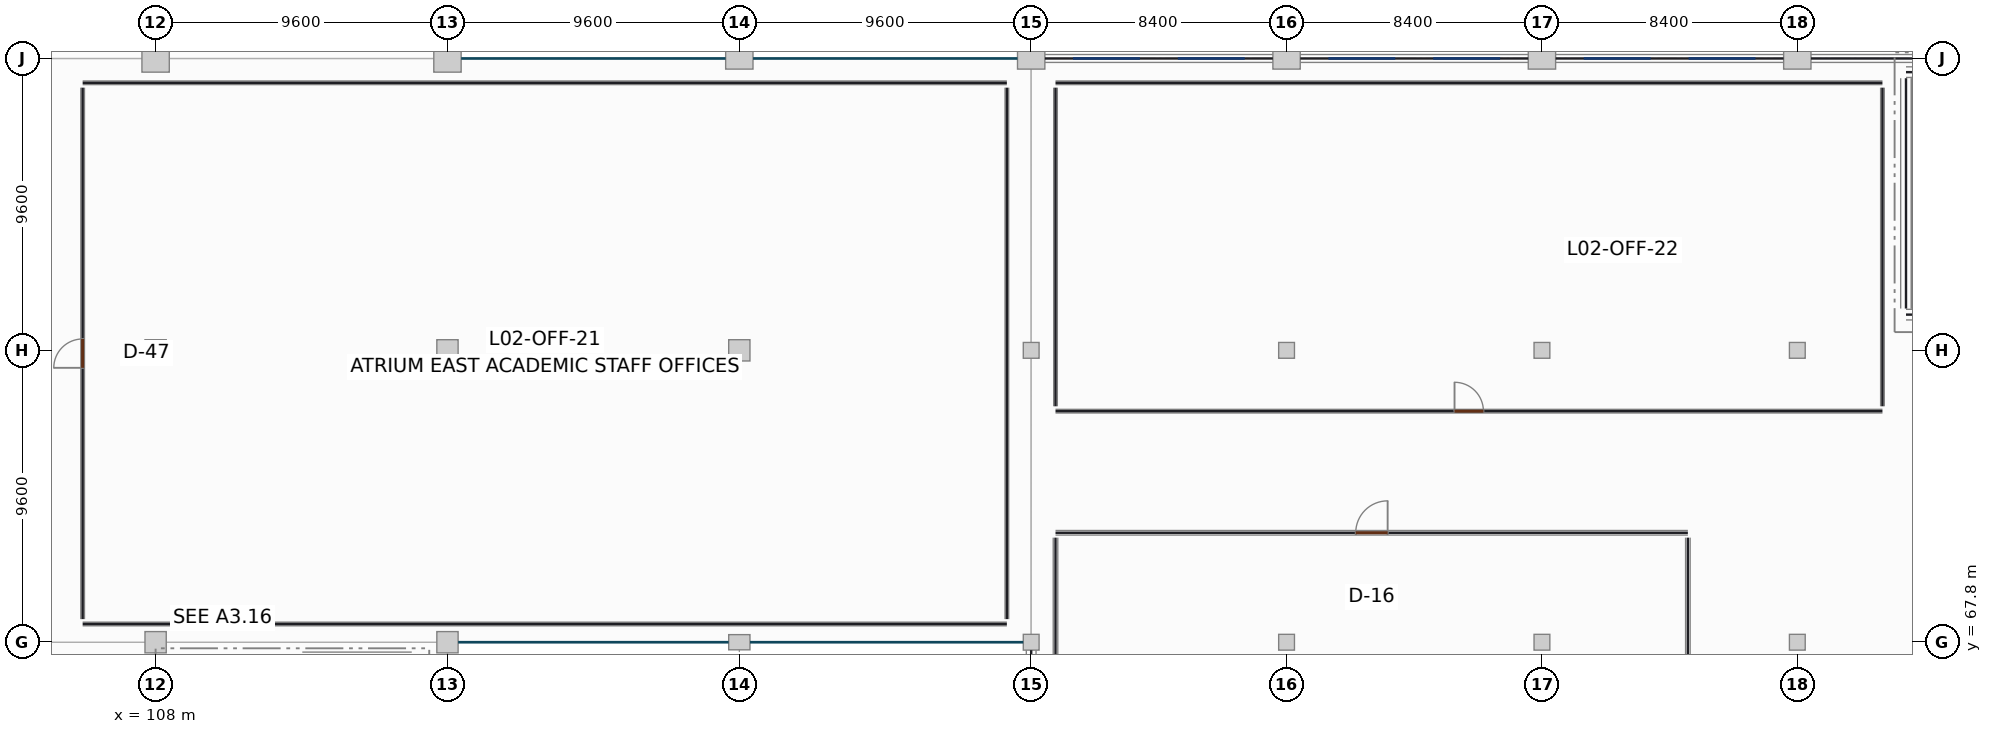
"""IFC4 building model, lengths in metres.
Left out: names, types, materials, properties, quantities, classifications, styles, units other than length and angle.
Written with IfcOpenShell. Run it as: python <this file> out.ifc"""

import sys

from ifc_helpers import new_model, si_unit, direction, frame, frame_2d, origin, origin_2d, place, context, subcontext, project, spatial, rectangle, extrude, element, fill, save


model = new_model("IFC4")
c1 = context("Model", 3, precision=1e-05, world=origin(), true_north=direction((0.0, 1.0)))
c2 = subcontext(c1, "Body", "Model", "MODEL_VIEW")
j1 = project(units=[si_unit("LENGTHUNIT", "METRE"), si_unit("PLANEANGLEUNIT", "RADIAN")], contexts=[c1])
p1 = place(None, origin())
s1 = spatial("IfcSite", under=j1, at=p1, CompositionType="ELEMENT")
p2 = place(p1, origin())
s2 = spatial("IfcBuilding", under=s1, at=p2, CompositionType="ELEMENT")
p3 = place(p2, frame((0.0, 0.0, 9.9)))
s3 = spatial("IfcBuildingStorey", under=s2, at=p3, CompositionType="ELEMENT", Elevation=9.9)
for number, where, z_axis, x_axis in (
    (1, (108.0, 67.8, 0.0), (0.0, 0.0, 1.0), (1.0, 0.0, 0.0)),
    (2, (108.0, 77.4, 0.0), (0.0, 0.0, 1.0), (1.0, 0.0, 0.0)),
):
    element("IfcColumn", number, at=place(p3, frame(where, z_axis=z_axis, x_axis=x_axis)), inside=s3, PredefinedType="COLUMN", context=c2, shape_type="SweptSolid", body=[
        extrude(rectangle(XDim=0.7, YDim=0.7, at=origin_2d()), origin(), (0.0, 0.0, 1.0), 3.9),
    ])
p4 = place(p3, frame((108.0, 87.0, 0.0), z_axis=(0.0, 0.0, 1.0), x_axis=(1.0, 0.0, 0.0)))
e3 = element("IfcColumn", 3, at=p4, inside=s3, PredefinedType="COLUMN", context=c2, shape_type="SweptSolid", body=[
    extrude(rectangle(XDim=0.9, YDim=0.9, at=origin_2d()), origin(), (0.0, 0.0, 1.0), 3.9),
])
for number, where, z_axis, x_axis in (
    (4, (117.6, 67.8, 0.0), (0.0, 0.0, 1.0), (1.0, 0.0, 0.0)),
    (5, (117.6, 77.4, 0.0), (0.0, 0.0, 1.0), (1.0, 0.0, 0.0)),
):
    element("IfcColumn", number, at=place(p3, frame(where, z_axis=z_axis, x_axis=x_axis)), inside=s3, PredefinedType="COLUMN", context=c2, shape_type="SweptSolid", body=[
        extrude(rectangle(XDim=0.7, YDim=0.7, at=origin_2d()), origin(), (0.0, 0.0, 1.0), 3.9),
    ])
p5 = place(p3, frame((117.6, 87.0, 0.0), z_axis=(0.0, 0.0, 1.0), x_axis=(1.0, 0.0, 0.0)))
e6 = element("IfcColumn", 6, at=p5, inside=s3, PredefinedType="COLUMN", context=c2, shape_type="SweptSolid", body=[
    extrude(rectangle(XDim=0.9, YDim=0.9, at=origin_2d()), origin(), (0.0, 0.0, 1.0), 3.9),
])
p6 = place(p3, frame((127.2, 67.8, 0.0), z_axis=(0.0, 0.0, 1.0), x_axis=(1.0, 0.0, 0.0)))
e7 = element("IfcColumn", 7, at=p6, inside=s3, PredefinedType="COLUMN", context=c2, shape_type="SweptSolid", body=[
    extrude(rectangle(XDim=0.7, YDim=0.5, at=origin_2d()), origin(), (0.0, 0.0, 1.0), 3.9),
])
p7 = place(p3, frame((127.2, 77.4, 0.0), z_axis=(0.0, 0.0, 1.0), x_axis=(1.0, 0.0, 0.0)))
e8 = element("IfcColumn", 8, at=p7, inside=s3, PredefinedType="COLUMN", context=c2, shape_type="SweptSolid", body=[
    extrude(rectangle(XDim=0.7, YDim=0.7, at=origin_2d()), origin(), (0.0, 0.0, 1.0), 3.9),
])
p8 = place(p3, frame((127.2, 87.0, 0.0), z_axis=(0.0, 0.0, 1.0), x_axis=(1.0, 0.0, 0.0)))
e9 = element("IfcColumn", 9, at=p8, inside=s3, PredefinedType="COLUMN", context=c2, shape_type="SweptSolid", body=[
    extrude(rectangle(XDim=0.9, YDim=0.7, at=origin_2d()), origin(), (0.0, 0.0, 1.0), 3.9),
])
for number, where, z_axis, x_axis in (
    (10, (136.8, 67.8, 0.0), (0.0, 0.0, 1.0), (1.0, 0.0, 0.0)),
    (11, (136.8, 77.4, 0.0), (0.0, 0.0, 1.0), (1.0, 0.0, 0.0)),
):
    element("IfcColumn", number, at=place(p3, frame(where, z_axis=z_axis, x_axis=x_axis)), inside=s3, PredefinedType="COLUMN", context=c2, shape_type="SweptSolid", body=[
        extrude(rectangle(XDim=0.52, YDim=0.52, at=origin_2d()), origin(), (0.0, 0.0, 1.0), 3.96),
    ])
p9 = place(p3, frame((136.8, 87.0, 0.0), z_axis=(0.0, 0.0, 1.0), x_axis=(1.0, 0.0, 0.0)))
e12 = element("IfcColumn", 12, at=p9, inside=s3, PredefinedType="COLUMN", context=c2, shape_type="SweptSolid", body=[
    extrude(rectangle(XDim=0.9, YDim=0.7, at=origin_2d()), origin(), (0.0, 0.0, 1.0), 3.96),
])
for number, where, z_axis, x_axis in (
    (13, (145.2, 67.8, 0.0), (0.0, 0.0, 1.0), (1.0, 0.0, 0.0)),
    (14, (145.2, 77.4, 0.0), (0.0, 0.0, 1.0), (1.0, 0.0, 0.0)),
):
    element("IfcColumn", number, at=place(p3, frame(where, z_axis=z_axis, x_axis=x_axis)), inside=s3, PredefinedType="COLUMN", context=c2, shape_type="SweptSolid", body=[
        extrude(rectangle(XDim=0.52, YDim=0.52, at=origin_2d()), origin(), (0.0, 0.0, 1.0), 3.98),
    ])
p10 = place(p3, frame((145.2, 87.0, 0.0), z_axis=(0.0, 0.0, 1.0), x_axis=(1.0, 0.0, 0.0)))
e15 = element("IfcColumn", 15, at=p10, inside=s3, PredefinedType="COLUMN", context=c2, shape_type="SweptSolid", body=[
    extrude(rectangle(XDim=0.9, YDim=0.7, at=origin_2d()), origin(), (0.0, 0.0, 1.0), 3.98),
])
for number, where, z_axis, x_axis in (
    (16, (153.6, 67.8, 0.0), (0.0, 0.0, 1.0), (1.0, 0.0, 0.0)),
    (17, (153.6, 77.4, 0.0), (0.0, 0.0, 1.0), (1.0, 0.0, 0.0)),
):
    element("IfcColumn", number, at=place(p3, frame(where, z_axis=z_axis, x_axis=x_axis)), inside=s3, PredefinedType="COLUMN", context=c2, shape_type="SweptSolid", body=[
        extrude(rectangle(XDim=0.52, YDim=0.52, at=origin_2d()), origin(), (0.0, 0.0, 1.0), 3.98),
    ])
p11 = place(p3, frame((153.6, 87.0, 0.0), z_axis=(0.0, 0.0, 1.0), x_axis=(1.0, 0.0, 0.0)))
e18 = element("IfcColumn", 18, at=p11, inside=s3, PredefinedType="COLUMN", context=c2, shape_type="SweptSolid", body=[
    extrude(rectangle(XDim=0.9, YDim=0.7, at=origin_2d()), origin(), (0.0, 0.0, 1.0), 3.98),
])
for number, where, z_axis, x_axis in (
    (19, (162.0, 67.8, 0.0), (0.0, 0.0, 1.0), (1.0, 0.0, 0.0)),
    (20, (162.0, 77.4, 0.0), (0.0, 0.0, 1.0), (1.0, 0.0, 0.0)),
):
    element("IfcColumn", number, at=place(p3, frame(where, z_axis=z_axis, x_axis=x_axis)), inside=s3, PredefinedType="COLUMN", context=c2, shape_type="SweptSolid", body=[
        extrude(rectangle(XDim=0.52, YDim=0.52, at=origin_2d()), origin(), (0.0, 0.0, 1.0), 3.98),
    ])
p12 = place(p3, frame((162.0, 87.0, 0.0), z_axis=(0.0, 0.0, 1.0), x_axis=(1.0, 0.0, 0.0)))
e21 = element("IfcColumn", 21, at=p12, inside=s3, PredefinedType="COLUMN", context=c2, shape_type="SweptSolid", body=[
    extrude(rectangle(XDim=0.9, YDim=0.7, at=origin_2d()), origin(), (0.0, 0.0, 1.0), 3.98),
])
p13 = place(p3, frame((137.252, 87.0, 0.0), z_axis=(0.0, 0.0, 1.0), x_axis=(1.0, 0.0, 0.0)))
e22 = element("IfcWall", 22, at=p13, inside=s3, PredefinedType="SOLIDWALL", context=c2, shape_type="SweptSolid", body=[
    extrude(rectangle(XDim=7.496, YDim=0.26, at=frame_2d((3.748, 0.0))), origin(), (0.0, 0.0, 1.0), 3.08),
])
p14 = place(p13, frame((0.924, 0.0, 0.8)))
e23 = element("IfcOpeningElement", 23, at=p14, cuts=e22, PredefinedType="OPENING", context=c2, shape_type="SweptSolid", body=[
    extrude(rectangle(XDim=2.2, YDim=2.0, at=frame_2d((1.1, 1.0))), frame((0.0, 0.14, 0.0), z_axis=(0.0, -1.0, 0.0), x_axis=(1.0, 0.0, 0.0)), (0.0, 0.0, 1.0), 0.28),
])
p15 = place(p13, frame((4.372, 0.0, 0.8)))
e24 = element("IfcOpeningElement", 24, at=p15, cuts=e22, PredefinedType="OPENING", context=c2, shape_type="SweptSolid", body=[
    extrude(rectangle(XDim=2.2, YDim=2.0, at=frame_2d((1.1, 1.0))), frame((0.0, 0.14, 0.0), z_axis=(0.0, -1.0, 0.0), x_axis=(1.0, 0.0, 0.0)), (0.0, 0.0, 1.0), 0.28),
])
p16 = place(p3, frame((145.652, 87.0, 0.0), z_axis=(0.0, 0.0, 1.0), x_axis=(1.0, 0.0, 0.0)))
e25 = element("IfcWall", 25, at=p16, inside=s3, PredefinedType="SOLIDWALL", context=c2, shape_type="SweptSolid", body=[
    extrude(rectangle(XDim=7.496, YDim=0.26, at=frame_2d((3.748, 0.0))), origin(), (0.0, 0.0, 1.0), 3.08),
])
p17 = place(p16, frame((0.924, 0.0, 0.8)))
e26 = element("IfcOpeningElement", 26, at=p17, cuts=e25, PredefinedType="OPENING", context=c2, shape_type="SweptSolid", body=[
    extrude(rectangle(XDim=2.2, YDim=2.0, at=frame_2d((1.1, 1.0))), frame((0.0, 0.14, 0.0), z_axis=(0.0, -1.0, 0.0), x_axis=(1.0, 0.0, 0.0)), (0.0, 0.0, 1.0), 0.28),
])
p18 = place(p16, frame((4.372, 0.0, 0.8)))
e27 = element("IfcOpeningElement", 27, at=p18, cuts=e25, PredefinedType="OPENING", context=c2, shape_type="SweptSolid", body=[
    extrude(rectangle(XDim=2.2, YDim=2.0, at=frame_2d((1.1, 1.0))), frame((0.0, 0.14, 0.0), z_axis=(0.0, -1.0, 0.0), x_axis=(1.0, 0.0, 0.0)), (0.0, 0.0, 1.0), 0.28),
])
p19 = place(p3, frame((154.052, 87.0, 0.0), z_axis=(0.0, 0.0, 1.0), x_axis=(1.0, 0.0, 0.0)))
e28 = element("IfcWall", 28, at=p19, inside=s3, PredefinedType="SOLIDWALL", context=c2, shape_type="SweptSolid", body=[
    extrude(rectangle(XDim=7.496, YDim=0.26, at=frame_2d((3.748, 0.0))), origin(), (0.0, 0.0, 1.0), 3.08),
])
p20 = place(p19, frame((0.924, 0.0, 0.8)))
e29 = element("IfcOpeningElement", 29, at=p20, cuts=e28, PredefinedType="OPENING", context=c2, shape_type="SweptSolid", body=[
    extrude(rectangle(XDim=2.2, YDim=2.0, at=frame_2d((1.1, 1.0))), frame((0.0, 0.14, 0.0), z_axis=(0.0, -1.0, 0.0), x_axis=(1.0, 0.0, 0.0)), (0.0, 0.0, 1.0), 0.28),
])
p21 = place(p19, frame((4.372, 0.0, 0.8)))
e30 = element("IfcOpeningElement", 30, at=p21, cuts=e28, PredefinedType="OPENING", context=c2, shape_type="SweptSolid", body=[
    extrude(rectangle(XDim=2.2, YDim=2.0, at=frame_2d((1.1, 1.0))), frame((0.0, 0.14, 0.0), z_axis=(0.0, -1.0, 0.0), x_axis=(1.0, 0.0, 0.0)), (0.0, 0.0, 1.0), 0.28),
])
p22 = place(p3, frame((162.452, 87.0, 0.0), z_axis=(0.0, 0.0, 1.0), x_axis=(1.0, 0.0, 0.0)))
e31 = element("IfcWall", 31, at=p22, inside=s3, PredefinedType="SOLIDWALL", context=c2, shape_type="SweptSolid", body=[
    extrude(rectangle(XDim=7.496, YDim=0.26, at=frame_2d((3.748, 0.0))), origin(), (0.0, 0.0, 1.0), 3.08),
])
p23 = place(p22, frame((4.372, 0.0, 0.8)))
e32 = element("IfcOpeningElement", 32, at=p23, cuts=e31, PredefinedType="OPENING", context=c2, shape_type="SweptSolid", body=[
    extrude(rectangle(XDim=2.2, YDim=2.0, at=frame_2d((1.1, 1.0))), frame((0.0, 0.14, 0.0), z_axis=(0.0, -1.0, 0.0), x_axis=(1.0, 0.0, 0.0)), (0.0, 0.0, 1.0), 0.28),
])
p24 = place(p3, frame((136.8, 58.432, 0.0), z_axis=(0.0, 0.0, 1.0), x_axis=(0.0, 1.0, 0.0)))
e33 = element("IfcWall", 33, at=p24, inside=s3, PredefinedType="SOLIDWALL", context=c2, shape_type="SweptSolid", body=[
    extrude(rectangle(XDim=9.106, YDim=0.32, at=frame_2d((4.553, 0.0))), origin(), (0.0, 0.0, 1.0), 3.08),
])
p25 = place(p24, frame((1.609, 0.0, 0.85)))
e34 = element("IfcOpeningElement", 34, at=p25, cuts=e33, PredefinedType="OPENING", context=c2, shape_type="SweptSolid", body=[
    extrude(rectangle(XDim=1.7, YDim=1.95, at=frame_2d((0.85, 0.975))), frame((0.0, 0.17, 0.0), z_axis=(0.0, -1.0, 0.0), x_axis=(1.0, 0.0, 0.0)), (0.0, 0.0, 1.0), 0.34),
])
p26 = place(p24, frame((5.797, 0.0, 0.85)))
e35 = element("IfcOpeningElement", 35, at=p26, cuts=e33, PredefinedType="OPENING", context=c2, shape_type="SweptSolid", body=[
    extrude(rectangle(XDim=1.7, YDim=1.95, at=frame_2d((0.85, 0.975))), frame((0.0, 0.17, 0.0), z_axis=(0.0, -1.0, 0.0), x_axis=(1.0, 0.0, 0.0)), (0.0, 0.0, 1.0), 0.34),
])
p27 = place(p3, frame((112.825, 67.3, 0.0), z_axis=(0.0, 0.0, 1.0), x_axis=(1.0, 0.0, 0.0)))
e36 = element("IfcWall", 36, at=p27, inside=s3, PredefinedType="SHEAR", context=c2, shape_type="SweptSolid", body=[
    extrude(rectangle(XDim=3.6, YDim=0.35, at=frame_2d((1.8, 0.0))), origin(), (0.0, 0.0, 1.0), 3.9),
])
p28 = place(p3, frame((165.575, 78.575, 0.0), z_axis=(0.0, 0.0, 1.0), x_axis=(1.0, 0.0, 0.0)))
e37 = element("IfcWall", 37, at=p28, inside=s3, PredefinedType="SHEAR", context=c2, shape_type="SweptSolid", body=[
    extrude(rectangle(XDim=3.6, YDim=0.35, at=frame_2d((1.8, 0.0))), origin(), (0.0, 0.0, 1.0), 3.9),
])
p29 = place(p28, frame((1.1, 0.0, 0.0)))
e38 = element("IfcOpeningElement", 38, at=p29, cuts=e37, PredefinedType="OPENING", context=c2, shape_type="SweptSolid", body=[
    extrude(rectangle(XDim=1.2, YDim=2.2, at=frame_2d((0.6, 1.1))), frame((0.0, 0.185, 0.0), z_axis=(0.0, -1.0, 0.0), x_axis=(1.0, 0.0, 0.0)), (0.0, 0.0, 1.0), 0.37),
])
p30 = place(p3, frame((165.575, 78.775, 0.0), z_axis=(0.0, 0.0, 1.0), x_axis=(0.0, 1.0, 0.0)))
e39 = element("IfcWall", 39, at=p30, inside=s3, PredefinedType="SHEAR", context=c2, shape_type="SweptSolid", body=[
    extrude(rectangle(XDim=7.575, YDim=0.35, at=frame_2d((3.788, 0.0))), origin(), (0.0, 0.0, 1.0), 3.9),
])
p31 = place(p3, frame((165.575, 86.55, 0.0), z_axis=(0.0, 0.0, 1.0), x_axis=(1.0, 0.0, 0.0)))
e40 = element("IfcWall", 40, at=p31, inside=s3, PredefinedType="SHEAR", context=c2, shape_type="SweptSolid", body=[
    extrude(rectangle(XDim=3.6, YDim=0.35, at=frame_2d((1.8, 0.0))), origin(), (0.0, 0.0, 1.0), 3.9),
])
for number, where, z_axis, x_axis in (
    (41, (105.6, 68.4, 0.0), (0.0, 0.0, 1.0), (1.0, 0.0, 0.0)),
    (42, (105.6, 86.2, 0.0), (0.0, 0.0, 1.0), (1.0, 0.0, 0.0)),
):
    element("IfcWall", number, at=place(p3, frame(where, z_axis=z_axis, x_axis=x_axis)), inside=s3, PredefinedType="PARTITIONING", context=c2, shape_type="SweptSolid", body=[
        extrude(rectangle(XDim=30.4, YDim=0.12, at=frame_2d((15.2, 0.0))), origin(), (0.0, 0.0, 1.0), 2.92),
    ])
p32 = place(p3, frame((105.6, 68.56, 0.0), z_axis=(0.0, 0.0, 1.0), x_axis=(0.0, 1.0, 0.0)))
e43 = element("IfcWall", 43, at=p32, inside=s3, PredefinedType="PARTITIONING", context=c2, shape_type="SweptSolid", body=[
    extrude(rectangle(XDim=17.48, YDim=0.12, at=frame_2d((8.74, 0.0))), origin(), (0.0, 0.0, 1.0), 2.92),
])
p33 = place(p32, frame((8.265, 0.0, 0.0)))
e44 = element("IfcOpeningElement", 44, at=p33, cuts=e43, PredefinedType="OPENING", context=c2, shape_type="SweptSolid", body=[
    extrude(rectangle(XDim=0.95, YDim=2.15, at=frame_2d((0.475, 1.075))), frame((0.0, 0.07, 0.0), z_axis=(0.0, -1.0, 0.0), x_axis=(1.0, 0.0, 0.0)), (0.0, 0.0, 1.0), 0.14),
])
p34 = place(p3, frame((136.0, 68.56, 0.0), z_axis=(0.0, 0.0, 1.0), x_axis=(0.0, 1.0, 0.0)))
e45 = element("IfcWall", 45, at=p34, inside=s3, PredefinedType="PARTITIONING", context=c2, shape_type="SweptSolid", body=[
    extrude(rectangle(XDim=17.48, YDim=0.12, at=frame_2d((8.74, 0.0))), origin(), (0.0, 0.0, 1.0), 2.92),
])
p35 = place(p3, frame((137.6, 71.4, 0.0), z_axis=(0.0, 0.0, 1.0), x_axis=(1.0, 0.0, 0.0)))
e46 = element("IfcWall", 46, at=p35, inside=s3, PredefinedType="PARTITIONING", context=c2, shape_type="SweptSolid", body=[
    extrude(rectangle(XDim=20.8, YDim=0.15, at=frame_2d((10.4, 0.0))), origin(), (0.0, 0.0, 1.0), 2.92),
])
p36 = place(p35, frame((9.875, 0.0, 0.0)))
e47 = element("IfcOpeningElement", 47, at=p36, cuts=e46, PredefinedType="OPENING", context=c2, shape_type="SweptSolid", body=[
    extrude(rectangle(XDim=1.05, YDim=2.2, at=frame_2d((0.525, 1.1))), frame((0.0, 0.085, 0.0), z_axis=(0.0, -1.0, 0.0), x_axis=(1.0, 0.0, 0.0)), (0.0, 0.0, 1.0), 0.17),
])
for number, where, z_axis, x_axis in (
    (48, (137.6, 58.96, 0.0), (0.0, 0.0, 1.0), (0.0, 1.0, 0.0)),
    (49, (158.4, 58.96, 0.0), (0.0, 0.0, 1.0), (0.0, 1.0, 0.0)),
):
    element("IfcWall", number, at=place(p3, frame(where, z_axis=z_axis, x_axis=x_axis)), inside=s3, PredefinedType="PARTITIONING", context=c2, shape_type="SweptSolid", body=[
        extrude(rectangle(XDim=12.28, YDim=0.15, at=frame_2d((6.14, 0.0))), origin(), (0.0, 0.0, 1.0), 2.92),
    ])
p37 = place(p3, frame((137.6, 75.4, 0.0), z_axis=(0.0, 0.0, 1.0), x_axis=(1.0, 0.0, 0.0)))
e50 = element("IfcWall", 50, at=p37, inside=s3, PredefinedType="PARTITIONING", context=c2, shape_type="SweptSolid", body=[
    extrude(rectangle(XDim=27.2, YDim=0.12, at=frame_2d((13.6, 0.0))), origin(), (0.0, 0.0, 1.0), 2.92),
])
p38 = place(p37, frame((13.125, 0.0, 0.0)))
e51 = element("IfcOpeningElement", 51, at=p38, cuts=e50, PredefinedType="OPENING", context=c2, shape_type="SweptSolid", body=[
    extrude(rectangle(XDim=0.95, YDim=2.15, at=frame_2d((0.475, 1.075))), frame((0.0, 0.07, 0.0), z_axis=(0.0, -1.0, 0.0), x_axis=(1.0, 0.0, 0.0)), (0.0, 0.0, 1.0), 0.14),
])
p39 = place(p3, frame((137.6, 86.2, 0.0), z_axis=(0.0, 0.0, 1.0), x_axis=(1.0, 0.0, 0.0)))
e52 = element("IfcWall", 52, at=p39, inside=s3, PredefinedType="PARTITIONING", context=c2, shape_type="SweptSolid", body=[
    extrude(rectangle(XDim=27.2, YDim=0.12, at=frame_2d((13.6, 0.0))), origin(), (0.0, 0.0, 1.0), 2.92),
])
for number, where, z_axis, x_axis in (
    (53, (137.6, 75.56, 0.0), (0.0, 0.0, 1.0), (0.0, 1.0, 0.0)),
    (54, (164.8, 75.56, 0.0), (0.0, 0.0, 1.0), (0.0, 1.0, 0.0)),
):
    element("IfcWall", number, at=place(p3, frame(where, z_axis=z_axis, x_axis=x_axis)), inside=s3, PredefinedType="PARTITIONING", context=c2, shape_type="SweptSolid", body=[
        extrude(rectangle(XDim=10.48, YDim=0.12, at=frame_2d((5.24, 0.0))), origin(), (0.0, 0.0, 1.0), 2.92),
    ])
p40 = place(p14, origin())
e55 = element("IfcWindow", 55, at=p40, inside=s3, PartitioningType="SINGLE_PANEL", PredefinedType="WINDOW", context=c2, shape_type="SweptSolid", body=[
    extrude(rectangle(XDim=2.2, YDim=2.0, at=frame_2d((1.1, 1.0))), frame((0.0, 0.03, 0.0), z_axis=(0.0, -1.0, 0.0), x_axis=(1.0, 0.0, 0.0)), (0.0, 0.0, 1.0), 0.06),
])
fill(e23, e55)
p41 = place(p15, origin())
e56 = element("IfcWindow", 56, at=p41, inside=s3, PartitioningType="SINGLE_PANEL", PredefinedType="WINDOW", context=c2, shape_type="SweptSolid", body=[
    extrude(rectangle(XDim=2.2, YDim=2.0, at=frame_2d((1.1, 1.0))), frame((0.0, 0.03, 0.0), z_axis=(0.0, -1.0, 0.0), x_axis=(1.0, 0.0, 0.0)), (0.0, 0.0, 1.0), 0.06),
])
fill(e24, e56)
p42 = place(p17, origin())
e57 = element("IfcWindow", 57, at=p42, inside=s3, PartitioningType="SINGLE_PANEL", PredefinedType="WINDOW", context=c2, shape_type="SweptSolid", body=[
    extrude(rectangle(XDim=2.2, YDim=2.0, at=frame_2d((1.1, 1.0))), frame((0.0, 0.03, 0.0), z_axis=(0.0, -1.0, 0.0), x_axis=(1.0, 0.0, 0.0)), (0.0, 0.0, 1.0), 0.06),
])
fill(e26, e57)
p43 = place(p18, origin())
e58 = element("IfcWindow", 58, at=p43, inside=s3, PartitioningType="SINGLE_PANEL", PredefinedType="WINDOW", context=c2, shape_type="SweptSolid", body=[
    extrude(rectangle(XDim=2.2, YDim=2.0, at=frame_2d((1.1, 1.0))), frame((0.0, 0.03, 0.0), z_axis=(0.0, -1.0, 0.0), x_axis=(1.0, 0.0, 0.0)), (0.0, 0.0, 1.0), 0.06),
])
fill(e27, e58)
p44 = place(p20, origin())
e59 = element("IfcWindow", 59, at=p44, inside=s3, PartitioningType="SINGLE_PANEL", PredefinedType="WINDOW", context=c2, shape_type="SweptSolid", body=[
    extrude(rectangle(XDim=2.2, YDim=2.0, at=frame_2d((1.1, 1.0))), frame((0.0, 0.03, 0.0), z_axis=(0.0, -1.0, 0.0), x_axis=(1.0, 0.0, 0.0)), (0.0, 0.0, 1.0), 0.06),
])
fill(e29, e59)
p45 = place(p21, origin())
e60 = element("IfcWindow", 60, at=p45, inside=s3, PartitioningType="SINGLE_PANEL", PredefinedType="WINDOW", context=c2, shape_type="SweptSolid", body=[
    extrude(rectangle(XDim=2.2, YDim=2.0, at=frame_2d((1.1, 1.0))), frame((0.0, 0.03, 0.0), z_axis=(0.0, -1.0, 0.0), x_axis=(1.0, 0.0, 0.0)), (0.0, 0.0, 1.0), 0.06),
])
fill(e30, e60)
p46 = place(p33, origin())
e61 = element("IfcDoor", 61, at=p46, inside=s3, OperationType="SINGLE_SWING_LEFT", PredefinedType="DOOR", context=c2, shape_type="SweptSolid", body=[
    extrude(rectangle(XDim=0.95, YDim=2.15, at=frame_2d((0.475, 1.075))), frame((0.0, 0.025, 0.0), z_axis=(0.0, -1.0, 0.0), x_axis=(1.0, 0.0, 0.0)), (0.0, 0.0, 1.0), 0.05),
])
fill(e44, e61)
p47 = place(p36, origin())
e62 = element("IfcDoor", 62, at=p47, inside=s3, OperationType="SINGLE_SWING_RIGHT", PredefinedType="DOOR", context=c2, shape_type="SweptSolid", body=[
    extrude(rectangle(XDim=1.05, YDim=2.2, at=frame_2d((0.525, 1.1))), frame((0.0, 0.025, 0.0), z_axis=(0.0, -1.0, 0.0), x_axis=(1.0, 0.0, 0.0)), (0.0, 0.0, 1.0), 0.05),
])
fill(e47, e62)
p48 = place(p38, origin())
e63 = element("IfcDoor", 63, at=p48, inside=s3, OperationType="SINGLE_SWING_LEFT", PredefinedType="DOOR", context=c2, shape_type="SweptSolid", body=[
    extrude(rectangle(XDim=0.95, YDim=2.15, at=frame_2d((0.475, 1.075))), frame((0.0, 0.025, 0.0), z_axis=(0.0, -1.0, 0.0), x_axis=(1.0, 0.0, 0.0)), (0.0, 0.0, 1.0), 0.05),
])
fill(e51, e63)
save(model, sys.argv[1])
